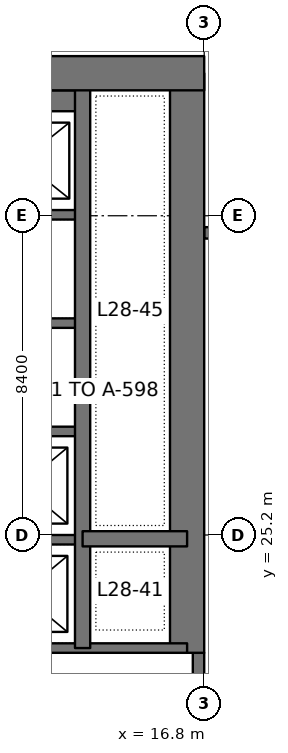
"""IFC4 building model, lengths in metres.
Left out: names, types, materials, properties, quantities, classifications, styles, units other than length and angle.
Written with IfcOpenShell. Run it as: python <this file> out.ifc"""

import sys

from ifc_helpers import new_model, si_unit, direction, frame, frame_2d, origin, place, context, subcontext, project, spatial, rectangle, extrude, element, save


model = new_model("IFC4")
c1 = context("Model", 3, precision=1e-05, world=origin(), true_north=direction((0.0, 1.0)))
c2 = subcontext(c1, "Body", "Model", "MODEL_VIEW")
j1 = project(units=[si_unit("LENGTHUNIT", "METRE"), si_unit("PLANEANGLEUNIT", "RADIAN")], contexts=[c1])
p1 = place(None, origin())
s1 = spatial("IfcSite", under=j1, at=p1, CompositionType="ELEMENT")
p2 = place(p1, origin())
s2 = spatial("IfcBuilding", under=s1, at=p2, CompositionType="ELEMENT")
p3 = place(p2, frame((0.0, 0.0, 126.0)))
s3 = spatial("IfcBuildingStorey", under=s2, at=p3, CompositionType="ELEMENT", Elevation=126.0)
p4 = place(p3, frame((-1.2, 37.35, 0.0), z_axis=(0.0, 0.0, 1.0), x_axis=(1.0, 0.0, 0.0)))
e1 = element("IfcWall", 1, at=p4, inside=s3, PredefinedType="SHEAR", context=c2, shape_type="SweptSolid", body=[
    extrude(rectangle(XDim=18.0, YDim=0.9, at=frame_2d((9.0, 0.0))), origin(), (0.0, 0.0, 1.0), 4.2),
])
p5 = place(p4, frame((8.95, 0.0, 0.0)))
e2 = element("IfcOpeningElement", 2, at=p5, cuts=e1, PredefinedType="OPENING", context=c2, shape_type="SweptSolid", body=[
    extrude(rectangle(XDim=1.8, YDim=2.4, at=frame_2d((0.9, 1.2))), frame((0.0, 0.46, 0.0), z_axis=(0.0, -1.0, 0.0), x_axis=(1.0, 0.0, 0.0)), (0.0, 0.0, 1.0), 0.92),
])
p6 = place(p3, frame((16.35, 22.1, 0.0), z_axis=(0.0, 0.0, 1.0), x_axis=(0.0, 1.0, 0.0)))
e3 = element("IfcWall", 3, at=p6, inside=s3, PredefinedType="SHEAR", context=c2, shape_type="SweptSolid", body=[
    extrude(rectangle(XDim=15.25, YDim=0.9, at=frame_2d((7.625, 0.0))), origin(), (0.0, 0.0, 1.0), 4.2),
])
p7 = place(p3, frame((13.6, 22.225, 0.0), z_axis=(0.0, 0.0, 1.0), x_axis=(0.0, 1.0, 0.0)))
e4 = element("IfcWall", 4, at=p7, inside=s3, PredefinedType="SHEAR", context=c2, shape_type="SweptSolid", body=[
    extrude(rectangle(XDim=15.125, YDim=0.4, at=frame_2d((7.562, 0.0))), origin(), (0.0, 0.0, 1.0), 4.2),
])
p8 = place(p3, frame((13.6, 25.1, 0.0), z_axis=(0.0, 0.0, 1.0), x_axis=(1.0, 0.0, 0.0)))
e5 = element("IfcWall", 5, at=p8, inside=s3, PredefinedType="SHEAR", context=c2, shape_type="SweptSolid", body=[
    extrude(rectangle(XDim=2.75, YDim=0.4, at=frame_2d((1.375, 0.0))), origin(), (0.0, 0.0, 1.0), 4.2),
])
p9 = place(p3, frame((10.4, 22.225, 0.0), z_axis=(0.0, 0.0, 1.0), x_axis=(1.0, 0.0, 0.0)))
e6 = element("IfcWall", 6, at=p9, inside=s3, PredefinedType="SHEAR", context=c2, shape_type="SweptSolid", body=[
    extrude(rectangle(XDim=5.95, YDim=0.25, at=frame_2d((2.975, 0.0))), origin(), (0.0, 0.0, 1.0), 4.2),
])
for number, where, z_axis, x_axis in (
    (7, (10.4, 25.075, 0.0), (0.0, 0.0, 1.0), (1.0, 0.0, 0.0)),
    (8, (10.4, 27.925, 0.0), (0.0, 0.0, 1.0), (1.0, 0.0, 0.0)),
    (9, (10.4, 30.775, 0.0), (0.0, 0.0, 1.0), (1.0, 0.0, 0.0)),
    (10, (10.4, 33.625, 0.0), (0.0, 0.0, 1.0), (1.0, 0.0, 0.0)),
):
    element("IfcWall", number, at=place(p3, frame(where, z_axis=z_axis, x_axis=x_axis)), inside=s3, PredefinedType="SHEAR", context=c2, shape_type="SweptSolid", body=[
        extrude(rectangle(XDim=3.2, YDim=0.25, at=frame_2d((1.6, 0.0))), origin(), (0.0, 0.0, 1.0), 4.2),
    ])
p10 = place(p3, frame((10.4, 36.625, 0.0), z_axis=(0.0, 0.0, 1.0), x_axis=(1.0, 0.0, 0.0)))
e11 = element("IfcWall", 11, at=p10, inside=s3, PredefinedType="SHEAR", context=c2, shape_type="SweptSolid", body=[
    extrude(rectangle(XDim=3.2, YDim=0.55, at=frame_2d((1.6, 0.0))), origin(), (0.0, 0.0, 1.0), 4.2),
])
p11 = place(p3, frame((16.65, 17.1, 0.0), z_axis=(0.0, 0.0, 1.0), x_axis=(0.0, 1.0, 0.0)))
e12 = element("IfcWall", 12, at=p11, inside=s3, PredefinedType="SOLIDWALL", context=c2, shape_type="SweptSolid", body=[
    extrude(rectangle(XDim=5.0, YDim=0.3, at=frame_2d((2.5, 0.0))), origin(), (0.0, 0.0, 1.0), 4.05),
])
p12 = place(p11, frame((1.3, 0.0, 0.1)))
e13 = element("IfcOpeningElement", 13, at=p12, cuts=e12, PredefinedType="OPENING", context=c2, shape_type="SweptSolid", body=[
    extrude(rectangle(XDim=2.0, YDim=3.0, at=frame_2d((1.0, 1.5))), frame((0.0, 0.16, 0.0), z_axis=(0.0, -1.0, 0.0), x_axis=(1.0, 0.0, 0.0)), (0.0, 0.0, 1.0), 0.32),
])
p13 = place(p3, frame((16.8, 33.15, 0.0), z_axis=(0.0, 0.0, 1.0), x_axis=(1.0, 0.0, 0.0)))
e14 = element("IfcWall", 14, at=p13, inside=s3, PredefinedType="SOLIDWALL", context=c2, shape_type="SweptSolid", body=[
    extrude(rectangle(XDim=7.575, YDim=0.3, at=frame_2d((3.788, 0.0))), origin(), (0.0, 0.0, 1.0), 4.05),
])
p14 = place(p13, frame((0.988, 0.0, 0.1)))
e15 = element("IfcOpeningElement", 15, at=p14, cuts=e14, PredefinedType="OPENING", context=c2, shape_type="SweptSolid", body=[
    extrude(rectangle(XDim=2.0, YDim=3.0, at=frame_2d((1.0, 1.5))), frame((0.0, 0.16, 0.0), z_axis=(0.0, -1.0, 0.0), x_axis=(1.0, 0.0, 0.0)), (0.0, 0.0, 1.0), 0.32),
])
p15 = place(p13, frame((4.587, 0.0, 0.1)))
e16 = element("IfcOpeningElement", 16, at=p15, cuts=e14, PredefinedType="OPENING", context=c2, shape_type="SweptSolid", body=[
    extrude(rectangle(XDim=2.0, YDim=3.0, at=frame_2d((1.0, 1.5))), frame((0.0, 0.16, 0.0), z_axis=(0.0, -1.0, 0.0), x_axis=(1.0, 0.0, 0.0)), (0.0, 0.0, 1.0), 0.32),
])
save(model, sys.argv[1])
